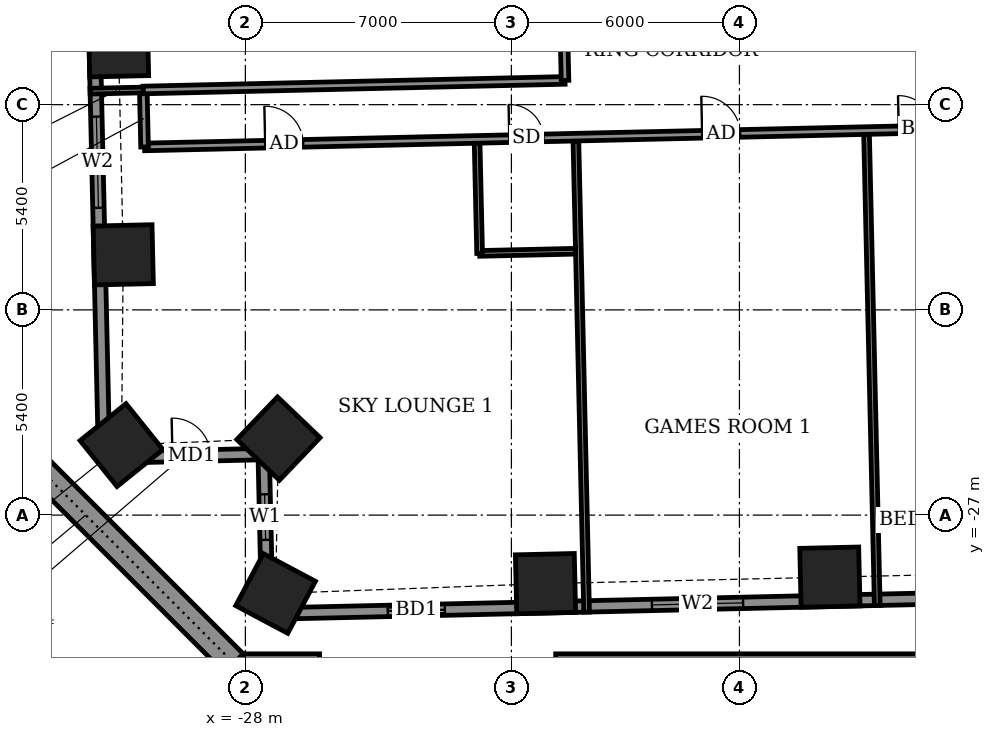
"""IFC4 building model, lengths in metres.
Left out: names, types, materials, properties, quantities, classifications, styles, units other than length and angle.
Written with IfcOpenShell. Run it as: python <this file> out.ifc"""

import sys

from ifc_helpers import new_model, si_unit, direction, frame, frame_2d, origin, origin_2d, place, context, subcontext, project, spatial, rectangle, extrude, element, fill, save


model = new_model("IFC4")
c1 = context("Model", 3, precision=1e-05, world=origin(), true_north=direction((0.0, 1.0)))
c2 = subcontext(c1, "Body", "Model", "MODEL_VIEW")
j1 = project(units=[si_unit("LENGTHUNIT", "METRE"), si_unit("PLANEANGLEUNIT", "RADIAN")], contexts=[c1])
p1 = place(None, origin())
s1 = spatial("IfcSite", under=j1, at=p1, CompositionType="ELEMENT")
p2 = place(p1, origin())
s2 = spatial("IfcBuilding", under=s1, at=p2, CompositionType="ELEMENT")
p3 = place(p2, frame((0.0, 0.0, 29.5)))
s3 = spatial("IfcBuildingStorey", under=s2, at=p3, CompositionType="ELEMENT", Elevation=29.5)
for number, where, z_axis, x_axis in (
    (1, (-31.337, -14.678, -0.55), (0.0, 0.0, 1.0), (0.023, -1.0, 0.0)),
    (2, (-31.213, -20.151, -0.55), (0.0, 0.0, 1.0), (0.023, -1.0, 0.0)),
    (3, (-31.259, -25.157, -0.55), (0.0, 0.0, 1.0), (0.627, -0.779, 0.0)),
    (4, (-27.13, -24.987, -0.55), (0.0, 0.0, 1.0), (0.723, -0.691, 0.0)),
    (5, (-27.205, -29.062, -0.55), (0.0, 0.0, 1.0), (0.883, -0.469, 0.0)),
    (6, (-20.103, -28.802, -0.55), (0.0, 0.0, 1.0), (1.0, 0.023, 0.0)),
    (7, (-12.62, -28.632, -0.55), (0.0, 0.0, 1.0), (1.0, 0.023, 0.0)),
):
    element("IfcColumn", number, at=place(p3, frame(where, z_axis=z_axis, x_axis=x_axis)), inside=s3, PredefinedType="COLUMN", context=c2, shape_type="SweptSolid", body=[
        extrude(rectangle(XDim=1.55, YDim=1.55, at=origin_2d()), origin(), (0.0, 0.0, 1.0), 4.6),
    ])
p4 = place(p3, frame((-32.087, -9.164, 0.0), z_axis=(0.0, 0.0, 1.0), x_axis=(0.022651102902, -0.999743430855, 0.0)))
e8 = element("IfcWall", 8, at=p4, inside=s3, PredefinedType="SOLIDWALL", context=c2, shape_type="SweptSolid", body=[
    extrude(rectangle(XDim=16.329, YDim=0.3, at=frame_2d((8.165, 0.0))), origin(), (0.0, 0.0, 1.0), 4.05),
])
p5 = place(p4, frame((2.042, 0.0, 0.0)))
e9 = element("IfcOpeningElement", 9, at=p5, cuts=e8, PredefinedType="OPENING", context=c2, shape_type="SweptSolid", body=[
    extrude(rectangle(XDim=1.5, YDim=2.4, at=frame_2d((0.75, 1.2))), frame((0.0, 0.16, 0.0), z_axis=(0.0, -1.0, 0.0), x_axis=(1.0, 0.0, 0.0)), (0.0, 0.0, 1.0), 0.32),
])
p6 = place(p4, frame((7.354, 0.0, 0.9)))
e10 = element("IfcOpeningElement", 10, at=p6, cuts=e8, PredefinedType="OPENING", context=c2, shape_type="SweptSolid", body=[
    extrude(rectangle(XDim=2.4, YDim=1.5, at=frame_2d((1.2, 0.75))), frame((0.0, 0.16, 0.0), z_axis=(0.0, -1.0, 0.0), x_axis=(1.0, 0.0, 0.0)), (0.0, 0.0, 1.0), 0.32),
])
p7 = place(p3, frame((-31.717, -25.489, 0.0), z_axis=(0.0, 0.0, 1.0), x_axis=(0.999744320311, 0.022611811187, 0.0)))
e11 = element("IfcWall", 11, at=p7, inside=s3, PredefinedType="SOLIDWALL", context=c2, shape_type="SweptSolid", body=[
    extrude(rectangle(XDim=4.2, YDim=0.3, at=frame_2d((2.1, 0.0))), origin(), (0.0, 0.0, 1.0), 4.05),
])
p8 = place(p7, frame((1.8, 0.0, 0.0)))
e12 = element("IfcOpeningElement", 12, at=p8, cuts=e11, PredefinedType="OPENING", context=c2, shape_type="SweptSolid", body=[
    extrude(rectangle(XDim=1.0, YDim=2.1, at=frame_2d((0.5, 1.05))), frame((0.0, 0.16, 0.0), z_axis=(0.0, -1.0, 0.0), x_axis=(1.0, 0.0, 0.0)), (0.0, 0.0, 1.0), 0.32),
])
p9 = place(p3, frame((-27.518, -25.394, 0.0), z_axis=(0.0, 0.0, 1.0), x_axis=(0.022611811187, -0.999744320311, 0.0)))
e13 = element("IfcWall", 13, at=p9, inside=s3, PredefinedType="SOLIDWALL", context=c2, shape_type="SweptSolid", body=[
    extrude(rectangle(XDim=4.2, YDim=0.3, at=frame_2d((2.1, 0.0))), origin(), (0.0, 0.0, 1.0), 3.55),
])
p10 = place(p9, frame((1.058, 0.0, 0.9)))
e14 = element("IfcOpeningElement", 14, at=p10, cuts=e13, PredefinedType="OPENING", context=c2, shape_type="SweptSolid", body=[
    extrude(rectangle(XDim=1.2, YDim=1.5, at=frame_2d((0.6, 0.75))), frame((0.0, 0.16, 0.0), z_axis=(0.0, -1.0, 0.0), x_axis=(1.0, 0.0, 0.0)), (0.0, 0.0, 1.0), 0.32),
])
p11 = place(p3, frame((-27.423, -29.593, 0.0), z_axis=(0.0, 0.0, 1.0), x_axis=(0.999742563204, 0.022689365739, 0.0)))
e15 = element("IfcWall", 15, at=p11, inside=s3, PredefinedType="SOLIDWALL", context=c2, shape_type="SweptSolid", body=[
    extrude(rectangle(XDim=52.101, YDim=0.3, at=frame_2d((26.05, 0.0))), origin(), (0.0, 0.0, 1.0), 4.05),
])
p12 = place(p11, frame((3.173, 0.0, 0.0)))
e16 = element("IfcOpeningElement", 16, at=p12, cuts=e15, PredefinedType="OPENING", context=c2, shape_type="SweptSolid", body=[
    extrude(rectangle(XDim=1.5, YDim=2.4, at=frame_2d((0.75, 1.2))), frame((0.0, 0.16, 0.0), z_axis=(0.0, -1.0, 0.0), x_axis=(1.0, 0.0, 0.0)), (0.0, 0.0, 1.0), 0.32),
])
p13 = place(p11, frame((10.123, 0.0, 0.9)))
e17 = element("IfcOpeningElement", 17, at=p13, cuts=e15, PredefinedType="OPENING", context=c2, shape_type="SweptSolid", body=[
    extrude(rectangle(XDim=2.4, YDim=1.5, at=frame_2d((1.2, 0.75))), frame((0.0, 0.16, 0.0), z_axis=(0.0, -1.0, 0.0), x_axis=(1.0, 0.0, 0.0)), (0.0, 0.0, 1.0), 0.32),
])
p14 = place(p11, frame((17.8, 0.0, 0.0)))
e18 = element("IfcOpeningElement", 18, at=p14, cuts=e15, PredefinedType="OPENING", context=c2, shape_type="SweptSolid", body=[
    extrude(rectangle(XDim=1.5, YDim=2.4, at=frame_2d((0.75, 1.2))), frame((0.0, 0.16, 0.0), z_axis=(0.0, -1.0, 0.0), x_axis=(1.0, 0.0, 0.0)), (0.0, 0.0, 1.0), 0.32),
])
p15 = place(p11, frame((23.691, 0.0, 0.0)))
e19 = element("IfcOpeningElement", 19, at=p15, cuts=e15, PredefinedType="OPENING", context=c2, shape_type="SweptSolid", body=[
    extrude(rectangle(XDim=1.5, YDim=2.4, at=frame_2d((0.75, 1.2))), frame((0.0, 0.16, 0.0), z_axis=(0.0, -1.0, 0.0), x_axis=(1.0, 0.0, 0.0)), (0.0, 0.0, 1.0), 0.32),
])
p16 = place(p11, frame((26.909, 0.0, 0.0)))
e20 = element("IfcOpeningElement", 20, at=p16, cuts=e15, PredefinedType="OPENING", context=c2, shape_type="SweptSolid", body=[
    extrude(rectangle(XDim=1.5, YDim=2.4, at=frame_2d((0.75, 1.2))), frame((0.0, 0.16, 0.0), z_axis=(0.0, -1.0, 0.0), x_axis=(1.0, 0.0, 0.0)), (0.0, 0.0, 1.0), 0.32),
])
p17 = place(p11, frame((32.825, 0.0, 0.0)))
e21 = element("IfcOpeningElement", 21, at=p17, cuts=e15, PredefinedType="OPENING", context=c2, shape_type="SweptSolid", body=[
    extrude(rectangle(XDim=1.5, YDim=2.4, at=frame_2d((0.75, 1.2))), frame((0.0, 0.16, 0.0), z_axis=(0.0, -1.0, 0.0), x_axis=(1.0, 0.0, 0.0)), (0.0, 0.0, 1.0), 0.32),
])
p18 = place(p11, frame((39.821, 0.0, 0.9)))
e22 = element("IfcOpeningElement", 22, at=p18, cuts=e15, PredefinedType="OPENING", context=c2, shape_type="SweptSolid", body=[
    extrude(rectangle(XDim=2.4, YDim=1.5, at=frame_2d((1.2, 0.75))), frame((0.0, 0.16, 0.0), z_axis=(0.0, -1.0, 0.0), x_axis=(1.0, 0.0, 0.0)), (0.0, 0.0, 1.0), 0.32),
])
p19 = place(p11, frame((46.942, 0.0, 0.9)))
e23 = element("IfcOpeningElement", 23, at=p19, cuts=e15, PredefinedType="OPENING", context=c2, shape_type="SweptSolid", body=[
    extrude(rectangle(XDim=2.4, YDim=1.5, at=frame_2d((1.2, 0.75))), frame((0.0, 0.16, 0.0), z_axis=(0.0, -1.0, 0.0), x_axis=(1.0, 0.0, 0.0)), (0.0, 0.0, 1.0), 0.32),
])
p20 = place(p3, frame((-25.941, -31.009, 0.0), z_axis=(0.0, 0.0, 1.0), x_axis=(0.999743178102, 0.022662255828, 0.0)))
e24 = element("IfcWall", 24, at=p20, inside=s3, PredefinedType="USERDEFINED", context=c2, shape_type="SweptSolid", body=[
    extrude(rectangle(XDim=6.0, YDim=0.55, at=frame_2d((3.0, 0.0))), origin(), (0.0, 0.0, 1.0), 0.8),
])
p21 = place(p3, frame((-36.097, -23.103, 0.0), z_axis=(0.0, 0.0, 1.0), x_axis=(0.707106781187, -0.707106781187, 0.0)))
e25 = element("IfcWall", 25, at=p21, inside=s3, PredefinedType="STANDARD", context=c2, shape_type="SweptSolid", body=[
    extrude(rectangle(XDim=11.022, YDim=0.7, at=frame_2d((5.511, 0.0))), origin(), (0.0, 0.0, 1.0), 0.55),
])
p22 = place(p3, frame((-28.055, -31.0, 0.0), z_axis=(0.0, 0.0, 1.0), x_axis=(1.0, 0.0, 0.0)))
e26 = element("IfcWall", 26, at=p22, inside=s3, PredefinedType="STANDARD", context=c2, shape_type="SweptSolid", body=[
    extrude(rectangle(XDim=2.007, YDim=0.7, at=frame_2d((1.003, 0.0))), origin(), (0.0, 0.0, 1.0), 0.55),
])
p23 = place(p3, frame((-19.835, -31.0, 0.0), z_axis=(0.0, 0.0, 1.0), x_axis=(1.0, 0.0, 0.0)))
e27 = element("IfcWall", 27, at=p23, inside=s3, PredefinedType="STANDARD", context=c2, shape_type="SweptSolid", body=[
    extrude(rectangle(XDim=13.791, YDim=0.7, at=frame_2d((6.896, 0.0))), origin(), (0.0, 0.0, 1.0), 0.55),
])
p24 = place(p3, frame((-19.021, -29.552, 0.0), z_axis=(0.0, 0.0, 1.0), x_axis=(-0.022741979748, 0.999741367733, 0.0)))
e28 = element("IfcWall", 28, at=p24, inside=s3, PredefinedType="PARTITIONING", context=c2, shape_type="SweptSolid", body=[
    extrude(rectangle(XDim=12.399, YDim=0.15, at=frame_2d((6.2, 0.0))), origin(), (0.0, 0.0, 1.0), 3.55),
])
p25 = place(p3, frame((-11.373, -29.379, 0.0), z_axis=(0.0, 0.0, 1.0), x_axis=(-0.022740189192, 0.999741408463, 0.0)))
e29 = element("IfcWall", 29, at=p25, inside=s3, PredefinedType="PARTITIONING", context=c2, shape_type="SweptSolid", body=[
    extrude(rectangle(XDim=12.4, YDim=0.15, at=frame_2d((6.2, 0.0))), origin(), (0.0, 0.0, 1.0), 3.55),
])
p26 = place(p3, frame((-21.836, -20.114, 0.0), z_axis=(0.0, 0.0, 1.0), x_axis=(0.99974392816, 0.022629142889, 0.0)))
e30 = element("IfcWall", 30, at=p26, inside=s3, PredefinedType="PARTITIONING", context=c2, shape_type="SweptSolid", body=[
    extrude(rectangle(XDim=2.525, YDim=0.15, at=frame_2d((1.262, 0.0))), origin(), (0.0, 0.0, 1.0), 4.05),
])
p27 = place(p3, frame((-21.836, -20.114, 0.0), z_axis=(0.0, 0.0, 1.0), x_axis=(-0.022817032779, 0.999739657619, 0.0)))
e31 = element("IfcWall", 31, at=p27, inside=s3, PredefinedType="PARTITIONING", context=c2, shape_type="SweptSolid", body=[
    extrude(rectangle(XDim=2.9, YDim=0.15, at=frame_2d((1.45, 0.0))), origin(), (0.0, 0.0, 1.0), 4.05),
])
p28 = place(p3, frame((-30.652, -17.313, 0.0), z_axis=(0.0, 0.0, 1.0), x_axis=(0.999742623764, 0.02268669719, 0.0)))
e32 = element("IfcWall", 32, at=p28, inside=s3, PredefinedType="PARTITIONING", context=c2, shape_type="SweptSolid", body=[
    extrude(rectangle(XDim=58.8, YDim=0.2, at=frame_2d((29.4, 0.0))), origin(), (0.0, 0.0, 1.0), 4.05),
])
p29 = place(p28, frame((3.175, 0.0, 0.0)))
e33 = element("IfcOpeningElement", 33, at=p29, cuts=e32, PredefinedType="OPENING", context=c2, shape_type="SweptSolid", body=[
    extrude(rectangle(XDim=1.0, YDim=2.1, at=frame_2d((0.5, 1.05))), frame((0.0, 0.11, 0.0), z_axis=(0.0, -1.0, 0.0), x_axis=(1.0, 0.0, 0.0)), (0.0, 0.0, 1.0), 0.22),
])
p30 = place(p28, frame((9.6, 0.0, 0.0)))
e34 = element("IfcOpeningElement", 34, at=p30, cuts=e32, PredefinedType="OPENING", context=c2, shape_type="SweptSolid", body=[
    extrude(rectangle(XDim=0.9, YDim=2.1, at=frame_2d((0.45, 1.05))), frame((0.0, 0.11, 0.0), z_axis=(0.0, -1.0, 0.0), x_axis=(1.0, 0.0, 0.0)), (0.0, 0.0, 1.0), 0.22),
])
p31 = place(p28, frame((14.675, 0.0, 0.0)))
e35 = element("IfcOpeningElement", 35, at=p31, cuts=e32, PredefinedType="OPENING", context=c2, shape_type="SweptSolid", body=[
    extrude(rectangle(XDim=1.0, YDim=2.1, at=frame_2d((0.5, 1.05))), frame((0.0, 0.11, 0.0), z_axis=(0.0, -1.0, 0.0), x_axis=(1.0, 0.0, 0.0)), (0.0, 0.0, 1.0), 0.22),
])
p32 = place(p28, frame((19.85, 0.0, 0.0)))
e36 = element("IfcOpeningElement", 36, at=p32, cuts=e32, PredefinedType="OPENING", context=c2, shape_type="SweptSolid", body=[
    extrude(rectangle(XDim=0.9, YDim=2.1, at=frame_2d((0.45, 1.05))), frame((0.0, 0.11, 0.0), z_axis=(0.0, -1.0, 0.0), x_axis=(1.0, 0.0, 0.0)), (0.0, 0.0, 1.0), 0.22),
])
p33 = place(p28, frame((27.25, 0.0, 0.0)))
e37 = element("IfcOpeningElement", 37, at=p33, cuts=e32, PredefinedType="OPENING", context=c2, shape_type="SweptSolid", body=[
    extrude(rectangle(XDim=0.9, YDim=2.1, at=frame_2d((0.45, 1.05))), frame((0.0, 0.11, 0.0), z_axis=(0.0, -1.0, 0.0), x_axis=(1.0, 0.0, 0.0)), (0.0, 0.0, 1.0), 0.22),
])
p34 = place(p28, frame((29.85, 0.0, 0.0)))
e38 = element("IfcOpeningElement", 38, at=p34, cuts=e32, PredefinedType="OPENING", context=c2, shape_type="SweptSolid", body=[
    extrude(rectangle(XDim=0.9, YDim=2.1, at=frame_2d((0.45, 1.05))), frame((0.0, 0.11, 0.0), z_axis=(0.0, -1.0, 0.0), x_axis=(1.0, 0.0, 0.0)), (0.0, 0.0, 1.0), 0.22),
])
p35 = place(p28, frame((37.275, 0.0, 0.0)))
e39 = element("IfcOpeningElement", 39, at=p35, cuts=e32, PredefinedType="OPENING", context=c2, shape_type="SweptSolid", body=[
    extrude(rectangle(XDim=0.9, YDim=2.1, at=frame_2d((0.45, 1.05))), frame((0.0, 0.11, 0.0), z_axis=(0.0, -1.0, 0.0), x_axis=(1.0, 0.0, 0.0)), (0.0, 0.0, 1.0), 0.22),
])
p36 = place(p28, frame((41.625, 0.0, 0.0)))
e40 = element("IfcOpeningElement", 40, at=p36, cuts=e32, PredefinedType="OPENING", context=c2, shape_type="SweptSolid", body=[
    extrude(rectangle(XDim=1.0, YDim=2.1, at=frame_2d((0.5, 1.05))), frame((0.0, 0.11, 0.0), z_axis=(0.0, -1.0, 0.0), x_axis=(1.0, 0.0, 0.0)), (0.0, 0.0, 1.0), 0.22),
])
p37 = place(p28, frame((45.95, 0.0, 0.0)))
e41 = element("IfcOpeningElement", 41, at=p37, cuts=e32, PredefinedType="OPENING", context=c2, shape_type="SweptSolid", body=[
    extrude(rectangle(XDim=0.9, YDim=2.1, at=frame_2d((0.45, 1.05))), frame((0.0, 0.11, 0.0), z_axis=(0.0, -1.0, 0.0), x_axis=(1.0, 0.0, 0.0)), (0.0, 0.0, 1.0), 0.22),
])
p38 = place(p28, frame((52.782, 0.0, 0.0)))
e42 = element("IfcOpeningElement", 42, at=p38, cuts=e32, PredefinedType="OPENING", context=c2, shape_type="SweptSolid", body=[
    extrude(rectangle(XDim=1.0, YDim=2.1, at=frame_2d((0.5, 1.05))), frame((0.0, 0.11, 0.0), z_axis=(0.0, -1.0, 0.0), x_axis=(1.0, 0.0, 0.0)), (0.0, 0.0, 1.0), 0.22),
])
p39 = place(p3, frame((-30.652, -17.313, 0.0), z_axis=(0.0, 0.0, 1.0), x_axis=(-0.022632637625, 0.99974384905, 0.0)))
e43 = element("IfcWall", 43, at=p39, inside=s3, PredefinedType="PARTITIONING", context=c2, shape_type="SweptSolid", body=[
    extrude(rectangle(XDim=1.5, YDim=0.2, at=frame_2d((0.75, 0.0))), origin(), (0.0, 0.0, 1.0), 4.05),
])
p40 = place(p3, frame((-32.086, -15.845, 0.0), z_axis=(0.0, 0.0, 1.0), x_axis=(0.999754810245, 0.022143156767, 0.0)))
e44 = element("IfcWall", 44, at=p40, inside=s3, PredefinedType="PARTITIONING", context=c2, shape_type="SweptSolid", body=[
    extrude(rectangle(XDim=1.4, YDim=0.15, at=frame_2d((0.7, 0.0))), origin(), (0.0, 0.0, 1.0), 3.55),
])
p41 = place(p3, frame((-30.686, -15.814, 0.0), z_axis=(0.0, 0.0, 1.0), x_axis=(0.999742346277, 0.022698921993, 0.0)))
e45 = element("IfcWall", 45, at=p41, inside=s3, PredefinedType="PARTITIONING", context=c2, shape_type="SweptSolid", body=[
    extrude(rectangle(XDim=11.1, YDim=0.2, at=frame_2d((5.55, 0.0))), origin(), (0.0, 0.0, 1.0), 4.05),
])
p42 = place(p3, frame((-19.589, -15.562, 0.0), z_axis=(0.0, 0.0, 1.0), x_axis=(-0.02267447203, 0.999742901109, 0.0)))
e46 = element("IfcWall", 46, at=p42, inside=s3, PredefinedType="PARTITIONING", context=c2, shape_type="SweptSolid", body=[
    extrude(rectangle(XDim=27.65, YDim=0.2, at=frame_2d((13.825, 0.0))), origin(), (0.0, 0.0, 1.0), 4.05),
])
p43 = place(p42, frame((22.313, 0.0, 0.0)))
e47 = element("IfcOpeningElement", 47, at=p43, cuts=e46, PredefinedType="OPENING", context=c2, shape_type="SweptSolid", body=[
    extrude(rectangle(XDim=1.0, YDim=2.1, at=frame_2d((0.5, 1.05))), frame((0.0, 0.11, 0.0), z_axis=(0.0, -1.0, 0.0), x_axis=(1.0, 0.0, 0.0)), (0.0, 0.0, 1.0), 0.22),
])
p44 = place(p42, frame((26.0, 0.0, 0.0)))
e48 = element("IfcOpeningElement", 48, at=p44, cuts=e46, PredefinedType="OPENING", context=c2, shape_type="SweptSolid", body=[
    extrude(rectangle(XDim=0.9, YDim=2.1, at=frame_2d((0.45, 1.05))), frame((0.0, 0.11, 0.0), z_axis=(0.0, -1.0, 0.0), x_axis=(1.0, 0.0, 0.0)), (0.0, 0.0, 1.0), 0.22),
])
p45 = place(p42, frame((17.817, 0.0, 0.0)))
e49 = element("IfcOpeningElement", 49, at=p45, cuts=e46, PredefinedType="OPENING", context=c2, shape_type="SweptSolid", body=[
    extrude(rectangle(XDim=1.0, YDim=2.1, at=frame_2d((0.5, 1.05))), frame((0.0, 0.11, 0.0), z_axis=(0.0, -1.0, 0.0), x_axis=(1.0, 0.0, 0.0)), (0.0, 0.0, 1.0), 0.22),
])
p46 = place(p42, frame((12.1, 0.0, 0.0)))
e50 = element("IfcOpeningElement", 50, at=p46, cuts=e46, PredefinedType="OPENING", context=c2, shape_type="SweptSolid", body=[
    extrude(rectangle(XDim=1.0, YDim=2.1, at=frame_2d((0.5, 1.05))), frame((0.0, 0.11, 0.0), z_axis=(0.0, -1.0, 0.0), x_axis=(1.0, 0.0, 0.0)), (0.0, 0.0, 1.0), 0.22),
])
p47 = place(p42, frame((14.625, 0.0, 0.0)))
e51 = element("IfcOpeningElement", 51, at=p47, cuts=e46, PredefinedType="OPENING", context=c2, shape_type="SweptSolid", body=[
    extrude(rectangle(XDim=0.9, YDim=2.1, at=frame_2d((0.45, 1.05))), frame((0.0, 0.11, 0.0), z_axis=(0.0, -1.0, 0.0), x_axis=(1.0, 0.0, 0.0)), (0.0, 0.0, 1.0), 0.22),
])
p48 = place(p42, frame((9.825, 0.0, 0.0)))
e52 = element("IfcOpeningElement", 52, at=p48, cuts=e46, PredefinedType="OPENING", context=c2, shape_type="SweptSolid", body=[
    extrude(rectangle(XDim=1.0, YDim=2.1, at=frame_2d((0.5, 1.05))), frame((0.0, 0.11, 0.0), z_axis=(0.0, -1.0, 0.0), x_axis=(1.0, 0.0, 0.0)), (0.0, 0.0, 1.0), 0.22),
])
p49 = place(p42, frame((7.475, 0.0, 0.0)))
e53 = element("IfcOpeningElement", 53, at=p49, cuts=e46, PredefinedType="OPENING", context=c2, shape_type="SweptSolid", body=[
    extrude(rectangle(XDim=0.9, YDim=2.1, at=frame_2d((0.45, 1.05))), frame((0.0, 0.11, 0.0), z_axis=(0.0, -1.0, 0.0), x_axis=(1.0, 0.0, 0.0)), (0.0, 0.0, 1.0), 0.22),
])
p50 = place(p42, frame((1.612, 0.0, 0.0)))
e54 = element("IfcOpeningElement", 54, at=p50, cuts=e46, PredefinedType="OPENING", context=c2, shape_type="SweptSolid", body=[
    extrude(rectangle(XDim=1.0, YDim=2.1, at=frame_2d((0.5, 1.05))), frame((0.0, 0.11, 0.0), z_axis=(0.0, -1.0, 0.0), x_axis=(1.0, 0.0, 0.0)), (0.0, 0.0, 1.0), 0.22),
])
p51 = place(p42, frame((4.975, 0.0, 0.0)))
e55 = element("IfcOpeningElement", 55, at=p51, cuts=e46, PredefinedType="OPENING", context=c2, shape_type="SweptSolid", body=[
    extrude(rectangle(XDim=0.9, YDim=2.1, at=frame_2d((0.45, 1.05))), frame((0.0, 0.11, 0.0), z_axis=(0.0, -1.0, 0.0), x_axis=(1.0, 0.0, 0.0)), (0.0, 0.0, 1.0), 0.22),
])
p52 = place(p6, origin())
e56 = element("IfcWindow", 56, at=p52, inside=s3, PartitioningType="DOUBLE_PANEL_VERTICAL", PredefinedType="WINDOW", context=c2, shape_type="SweptSolid", body=[
    extrude(rectangle(XDim=2.4, YDim=1.5, at=frame_2d((1.2, 0.75))), frame((0.0, 0.03, 0.0), z_axis=(0.0, -1.0, 0.0), x_axis=(1.0, 0.0, 0.0)), (0.0, 0.0, 1.0), 0.06),
])
fill(e10, e56)
p53 = place(p8, origin())
e57 = element("IfcDoor", 57, at=p53, inside=s3, OperationType="SINGLE_SWING_LEFT", PredefinedType="DOOR", context=c2, shape_type="SweptSolid", body=[
    extrude(rectangle(XDim=1.0, YDim=2.1, at=frame_2d((0.5, 1.05))), frame((0.0, 0.025, 0.0), z_axis=(0.0, -1.0, 0.0), x_axis=(1.0, 0.0, 0.0)), (0.0, 0.0, 1.0), 0.05),
])
fill(e12, e57)
p54 = place(p10, origin())
e58 = element("IfcWindow", 58, at=p54, inside=s3, PartitioningType="SINGLE_PANEL", PredefinedType="WINDOW", context=c2, shape_type="SweptSolid", body=[
    extrude(rectangle(XDim=1.2, YDim=1.5, at=frame_2d((0.6, 0.75))), frame((0.0, 0.03, 0.0), z_axis=(0.0, -1.0, 0.0), x_axis=(1.0, 0.0, 0.0)), (0.0, 0.0, 1.0), 0.06),
])
fill(e14, e58)
p55 = place(p12, origin())
e59 = element("IfcDoor", 59, at=p55, inside=s3, OperationType="SLIDING_TO_LEFT", PredefinedType="DOOR", context=c2, shape_type="SweptSolid", body=[
    extrude(rectangle(XDim=1.5, YDim=2.4, at=frame_2d((0.75, 1.2))), frame((0.0, 0.025, 0.0), z_axis=(0.0, -1.0, 0.0), x_axis=(1.0, 0.0, 0.0)), (0.0, 0.0, 1.0), 0.05),
])
fill(e16, e59)
p56 = place(p13, origin())
e60 = element("IfcWindow", 60, at=p56, inside=s3, PartitioningType="DOUBLE_PANEL_VERTICAL", PredefinedType="WINDOW", context=c2, shape_type="SweptSolid", body=[
    extrude(rectangle(XDim=2.4, YDim=1.5, at=frame_2d((1.2, 0.75))), frame((0.0, 0.03, 0.0), z_axis=(0.0, -1.0, 0.0), x_axis=(1.0, 0.0, 0.0)), (0.0, 0.0, 1.0), 0.06),
])
fill(e17, e60)
p57 = place(p29, origin())
e61 = element("IfcDoor", 61, at=p57, inside=s3, OperationType="SINGLE_SWING_LEFT", PredefinedType="DOOR", context=c2, shape_type="SweptSolid", body=[
    extrude(rectangle(XDim=1.0, YDim=2.1, at=frame_2d((0.5, 1.05))), frame((0.0, 0.025, 0.0), z_axis=(0.0, -1.0, 0.0), x_axis=(1.0, 0.0, 0.0)), (0.0, 0.0, 1.0), 0.05),
])
fill(e33, e61)
p58 = place(p30, origin())
e62 = element("IfcDoor", 62, at=p58, inside=s3, OperationType="SINGLE_SWING_LEFT", PredefinedType="DOOR", context=c2, shape_type="SweptSolid", body=[
    extrude(rectangle(XDim=0.9, YDim=2.1, at=frame_2d((0.45, 1.05))), frame((0.0, 0.025, 0.0), z_axis=(0.0, -1.0, 0.0), x_axis=(1.0, 0.0, 0.0)), (0.0, 0.0, 1.0), 0.05),
])
fill(e34, e62)
p59 = place(p31, origin())
e63 = element("IfcDoor", 63, at=p59, inside=s3, OperationType="SINGLE_SWING_RIGHT", PredefinedType="DOOR", context=c2, shape_type="SweptSolid", body=[
    extrude(rectangle(XDim=1.0, YDim=2.1, at=frame_2d((0.5, 1.05))), frame((0.0, 0.025, 0.0), z_axis=(0.0, -1.0, 0.0), x_axis=(1.0, 0.0, 0.0)), (0.0, 0.0, 1.0), 0.05),
])
fill(e35, e63)
p60 = place(p32, origin())
e64 = element("IfcDoor", 64, at=p60, inside=s3, OperationType="SINGLE_SWING_LEFT", PredefinedType="DOOR", context=c2, shape_type="SweptSolid", body=[
    extrude(rectangle(XDim=0.9, YDim=2.1, at=frame_2d((0.45, 1.05))), frame((0.0, 0.025, 0.0), z_axis=(0.0, -1.0, 0.0), x_axis=(1.0, 0.0, 0.0)), (0.0, 0.0, 1.0), 0.05),
])
fill(e36, e64)
save(model, sys.argv[1])
